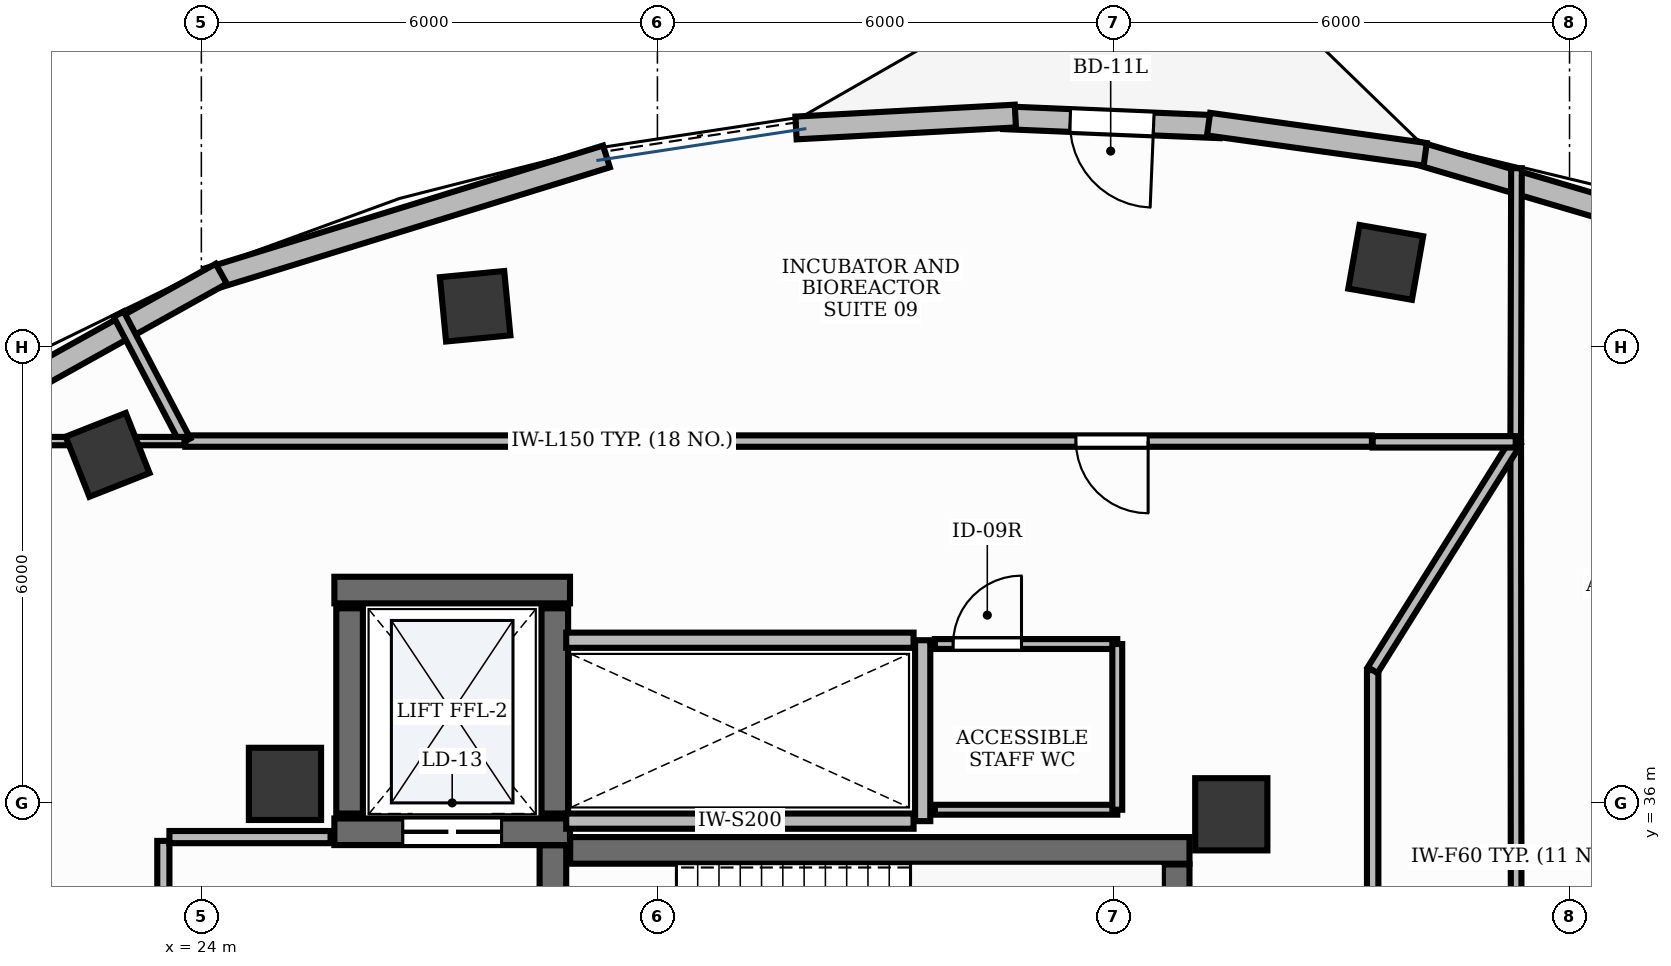
"""IFC4 building model, lengths in metres.
Left out: names, types, materials, properties, quantities, classifications, styles, units other than length and angle.
Written with IfcOpenShell. Run it as: python <this file> out.ifc"""

import sys

from ifc_helpers import new_model, si_unit, direction, frame, frame_2d, origin, origin_2d, place, context, subcontext, project, spatial, rectangle, extrude, element, fill, save


model = new_model("IFC4")
c1 = context("Model", 3, precision=1e-05, world=origin(), true_north=direction((0.0, 1.0)))
c2 = subcontext(c1, "Body", "Model", "MODEL_VIEW")
j1 = project(units=[si_unit("LENGTHUNIT", "METRE"), si_unit("PLANEANGLEUNIT", "RADIAN")], contexts=[c1])
p1 = place(None, origin())
s1 = spatial("IfcSite", under=j1, at=p1, CompositionType="ELEMENT")
p2 = place(p1, origin())
s2 = spatial("IfcBuilding", under=s1, at=p2, CompositionType="ELEMENT")
p3 = place(p2, frame((0.0, 0.0, 306.0)))
s3 = spatial("IfcBuildingStorey", under=s2, at=p3, CompositionType="ELEMENT", Elevation=306.0)
p4 = place(p3, frame((28.852, 35.375, 0.0), z_axis=(0.0, 0.0, 1.0), x_axis=(1.0, 0.0, 0.0)))
e1 = element("IfcWall", 1, at=p4, inside=s3, PredefinedType="SHEAR", context=c2, shape_type="SweptSolid", body=[
    extrude(rectangle(XDim=8.148, YDim=0.35, at=frame_2d((4.074, 0.0))), origin(), (0.0, 0.0, 1.0), 3.9),
])
p5 = place(p3, frame((36.825, 32.11, 0.0), z_axis=(0.0, 0.0, 1.0), x_axis=(0.0, 1.0, 0.0)))
e2 = element("IfcWall", 2, at=p5, inside=s3, PredefinedType="SHEAR", context=c2, shape_type="SweptSolid", body=[
    extrude(rectangle(XDim=3.08, YDim=0.35, at=frame_2d((1.54, 0.0))), origin(), (0.0, 0.0, 1.0), 3.9),
])
p6 = place(p3, frame((28.625, 32.11, 0.0), z_axis=(0.0, 0.0, 1.0), x_axis=(0.0, 1.0, 0.0)))
e3 = element("IfcWall", 3, at=p6, inside=s3, PredefinedType="SHEAR", context=c2, shape_type="SweptSolid", body=[
    extrude(rectangle(XDim=3.333, YDim=0.35, at=frame_2d((1.667, 0.0))), origin(), (0.0, 0.0, 1.0), 3.9),
])
p7 = place(p6, frame((0.2, 0.0, 0.0)))
e4 = element("IfcOpeningElement", 4, at=p7, cuts=e3, PredefinedType="OPENING", context=c2, shape_type="SweptSolid", body=[
    extrude(rectangle(XDim=1.05, YDim=2.15, at=frame_2d((0.525, 1.075))), frame((0.0, 0.19, 0.0), z_axis=(0.0, -1.0, 0.0), x_axis=(1.0, 0.0, 0.0)), (0.0, 0.0, 1.0), 0.38),
])
p8 = place(p3, frame((25.75, 38.8, 0.0), z_axis=(0.0, 0.0, 1.0), x_axis=(1.0, 0.0, 0.0)))
e5 = element("IfcWall", 5, at=p8, inside=s3, PredefinedType="SHEAR", context=c2, shape_type="SweptSolid", body=[
    extrude(rectangle(XDim=3.1, YDim=0.35, at=frame_2d((1.55, 0.0))), origin(), (0.0, 0.0, 1.0), 3.9),
])
p9 = place(p3, frame((25.75, 35.62, 0.0), z_axis=(0.0, 0.0, 1.0), x_axis=(1.0, 0.0, 0.0)))
e6 = element("IfcWall", 6, at=p9, inside=s3, PredefinedType="SHEAR", context=c2, shape_type="SweptSolid", body=[
    extrude(rectangle(XDim=3.1, YDim=0.35, at=frame_2d((1.55, 0.0))), origin(), (0.0, 0.0, 1.0), 3.9),
])
p10 = place(p9, frame((0.9, 0.0, 0.0)))
e7 = element("IfcOpeningElement", 7, at=p10, cuts=e6, PredefinedType="OPENING", context=c2, shape_type="SweptSolid", body=[
    extrude(rectangle(XDim=1.3, YDim=2.2, at=frame_2d((0.65, 1.1))), frame((0.0, 0.19, 0.0), z_axis=(0.0, -1.0, 0.0), x_axis=(1.0, 0.0, 0.0)), (0.0, 0.0, 1.0), 0.38),
])
for number, where, z_axis, x_axis in (
    (8, (25.95, 35.86, 0.0), (0.0, 0.0, 1.0), (0.0, 1.0, 0.0)),
    (9, (28.65, 35.86, 0.0), (0.0, 0.0, 1.0), (0.0, 1.0, 0.0)),
):
    element("IfcWall", number, at=place(p3, frame(where, z_axis=z_axis, x_axis=x_axis)), inside=s3, PredefinedType="SHEAR", context=c2, shape_type="SweptSolid", body=[
        extrude(rectangle(XDim=2.7, YDim=0.35, at=frame_2d((1.35, 0.0))), origin(), (0.0, 0.0, 1.0), 3.9),
    ])
for number, where, z_axis, x_axis in (
    (10, (37.55, 35.85, -0.0), (0.0, 0.0, 1.0), (1.0, 0.0, 0.0)),
    (11, (25.1, 36.25, -0.0), (0.0, 0.0, 1.0), (1.0, 0.0, 0.0)),
):
    element("IfcColumn", number, at=place(p3, frame(where, z_axis=z_axis, x_axis=x_axis)), inside=s3, PredefinedType="PILASTER", context=c2, shape_type="SweptSolid", body=[
        extrude(rectangle(XDim=0.95, YDim=0.95, at=origin_2d()), origin(), (0.0, 0.0, 1.0), 3.901),
    ])
for number, where, z_axis, x_axis in (
    (12, (39.582, 43.111, -0.0), (0.0, 0.0, 1.0), (-0.985, 0.173, 0.0)),
    (13, (27.602, 42.534, -0.0), (0.0, 0.0, 1.0), (0.995, 0.095, 0.0)),
    (14, (22.766, 40.579, -0.0), (0.0, 0.0, 1.0), (0.93, 0.367, 0.0)),
):
    element("IfcColumn", number, at=place(p3, frame(where, z_axis=z_axis, x_axis=x_axis)), inside=s3, PredefinedType="COLUMN", context=c2, shape_type="SweptSolid", body=[
        extrude(rectangle(XDim=0.85, YDim=0.85, at=origin_2d()), origin(), (0.0, 0.0, 1.0), 3.901),
    ])
p11 = place(p3, frame((37.403, 44.895, 0.0), z_axis=(0.0, 0.0, 1.0), x_axis=(-0.999122802085, 0.041876322124, 0.0)))
e15 = element("IfcWall", 15, at=p11, inside=s3, PredefinedType="STANDARD", context=c2, shape_type="SweptSolid", body=[
    extrude(rectangle(XDim=2.851, YDim=0.3, at=frame_2d((1.425, 0.0))), origin(), (0.0, 0.0, 1.0), 3.9),
])
p12 = place(p11, frame((0.875, 0.0, 0.0)))
e16 = element("IfcOpeningElement", 16, at=p12, cuts=e15, PredefinedType="OPENING", context=c2, shape_type="SweptSolid", body=[
    extrude(rectangle(XDim=1.1, YDim=2.15, at=frame_2d((0.55, 1.075))), frame((0.0, 0.165, 0.0), z_axis=(0.0, -1.0, 0.0), x_axis=(1.0, 0.0, 0.0)), (0.0, 0.0, 1.0), 0.33),
])
p13 = place(p3, frame((45.197, 43.018, 0.0), z_axis=(0.0, 0.0, 1.0), x_axis=(-0.959276315934, 0.282469378321, 0.0)))
e17 = element("IfcWall", 17, at=p13, inside=s3, PredefinedType="STANDARD", context=c2, shape_type="SweptSolid", body=[
    extrude(rectangle(XDim=5.495, YDim=0.3, at=frame_2d((2.748, 0.0))), origin(), (0.0, 0.0, 1.0), 3.9),
])
p14 = place(p3, frame((40.101, 44.532, 0.0), z_axis=(0.0, 0.0, 1.0), x_axis=(-0.990425679684, 0.138046995703, 0.0)))
e18 = element("IfcWall", 18, at=p14, inside=s3, PredefinedType="STANDARD", context=c2, shape_type="SweptSolid", body=[
    extrude(rectangle(XDim=2.877, YDim=0.3, at=frame_2d((1.439, 0.0))), origin(), (0.0, 0.0, 1.0), 3.9),
])
p15 = place(p3, frame((34.709, 45.036, 0.0), z_axis=(0.0, 0.0, 1.0), x_axis=(-0.998532534801, -0.054155119283, 0.0)))
e19 = element("IfcWall", 19, at=p15, inside=s3, PredefinedType="STANDARD", context=c2, shape_type="SweptSolid", body=[
    extrude(rectangle(XDim=2.89, YDim=0.3, at=frame_2d((1.445, 0.0))), origin(), (0.0, 0.0, 1.0), 3.9),
])
p16 = place(p3, frame((29.33, 44.505, 0.0), z_axis=(0.0, 0.0, 1.0), x_axis=(-0.955535200816, -0.29487705913, 0.0)))
e20 = element("IfcWall", 20, at=p16, inside=s3, PredefinedType="STANDARD", context=c2, shape_type="SweptSolid", body=[
    extrude(rectangle(XDim=5.485, YDim=0.3, at=frame_2d((2.743, 0.0))), origin(), (0.0, 0.0, 1.0), 3.47),
])
p17 = place(p3, frame((24.262, 42.962, 0.0), z_axis=(0.0, 0.0, 1.0), x_axis=(-0.87350676692, -0.486812004932, 0.0)))
e21 = element("IfcWall", 21, at=p17, inside=s3, PredefinedType="STANDARD", context=c2, shape_type="SweptSolid", body=[
    extrude(rectangle(XDim=5.282, YDim=0.3, at=frame_2d((2.641, 0.0))), origin(), (0.0, 0.0, 1.0), 3.47),
])
p18 = place(p3, frame((33.49, 35.76, 0.0), z_axis=(0.0, 0.0, 1.0), x_axis=(0.0, 1.0, 0.0)))
e22 = element("IfcWall", 22, at=p18, inside=s3, PredefinedType="PARTITIONING", context=c2, shape_type="SweptSolid", body=[
    extrude(rectangle(XDim=2.38, YDim=0.2, at=frame_2d((1.19, 0.0))), origin(), (0.0, 0.0, 1.0), 2.91),
])
for number, where, z_axis, x_axis in (
    (23, (28.8, 35.76, 0.0), (0.0, 0.0, 1.0), (1.0, 0.0, 0.0)),
    (24, (28.8, 38.14, 0.0), (0.0, 0.0, 1.0), (1.0, 0.0, 0.0)),
):
    element("IfcWall", number, at=place(p3, frame(where, z_axis=z_axis, x_axis=x_axis)), inside=s3, PredefinedType="PARTITIONING", context=c2, shape_type="SweptSolid", body=[
        extrude(rectangle(XDim=4.57, YDim=0.2, at=frame_2d((2.285, 0.0))), origin(), (0.0, 0.0, 1.0), 2.91),
    ])
p19 = place(p3, frame((23.5, 32.1, 0.0), z_axis=(0.0, 0.0, 1.0), x_axis=(0.0, 1.0, 0.0)))
e25 = element("IfcWall", 25, at=p19, inside=s3, PredefinedType="PARTITIONING", context=c2, shape_type="SweptSolid", body=[
    extrude(rectangle(XDim=3.4, YDim=0.16, at=frame_2d((1.7, 0.0))), origin(), (0.0, 0.0, 1.0), 2.91),
])
p20 = place(p19, frame((1.175, 0.0, 0.0)))
e26 = element("IfcOpeningElement", 26, at=p20, cuts=e25, PredefinedType="OPENING", context=c2, shape_type="SweptSolid", body=[
    extrude(rectangle(XDim=1.05, YDim=2.15, at=frame_2d((0.525, 1.075))), frame((0.0, 0.095, 0.0), z_axis=(0.0, -1.0, 0.0), x_axis=(1.0, 0.0, 0.0)), (0.0, 0.0, 1.0), 0.19),
])
p21 = place(p3, frame((23.58, 35.55, 0.0), z_axis=(0.0, 0.0, 1.0), x_axis=(1.0, 0.0, 0.0)))
e27 = element("IfcWall", 27, at=p21, inside=s3, PredefinedType="PARTITIONING", context=c2, shape_type="SweptSolid", body=[
    extrude(rectangle(XDim=2.12, YDim=0.16, at=frame_2d((1.06, 0.0))), origin(), (0.0, 0.0, 1.0), 2.91),
])
p22 = place(p3, frame((33.65, 38.09, 0.0), z_axis=(0.0, 0.0, 1.0), x_axis=(1.0, 0.0, 0.0)))
e28 = element("IfcWall", 28, at=p22, inside=s3, PredefinedType="PARTITIONING", context=c2, shape_type="SweptSolid", body=[
    extrude(rectangle(XDim=2.4, YDim=0.13, at=frame_2d((1.2, 0.0))), origin(), (0.0, 0.0, 1.0), 2.91),
])
p23 = place(p22, frame((0.24, 0.0, 0.0)))
e29 = element("IfcOpeningElement", 29, at=p23, cuts=e28, PredefinedType="OPENING", context=c2, shape_type="SweptSolid", body=[
    extrude(rectangle(XDim=0.9, YDim=2.15, at=frame_2d((0.45, 1.075))), frame((0.0, 0.08, 0.0), z_axis=(0.0, -1.0, 0.0), x_axis=(1.0, 0.0, 0.0)), (0.0, 0.0, 1.0), 0.16),
])
p24 = place(p3, frame((39.41, 29.322, 0.0), z_axis=(0.0, 0.0, 1.0), x_axis=(0.0, 1.0, 0.0)))
e30 = element("IfcWall", 30, at=p24, inside=s3, PredefinedType="PARTITIONING", context=c2, shape_type="SweptSolid", body=[
    extrude(rectangle(XDim=8.425, YDim=0.15, at=frame_2d((4.213, 0.0))), origin(), (0.0, 0.0, 1.0), 2.91),
])
p25 = place(p24, frame((0.881, 0.0, 0.0)))
e31 = element("IfcOpeningElement", 31, at=p25, cuts=e30, PredefinedType="OPENING", context=c2, shape_type="SweptSolid", body=[
    extrude(rectangle(XDim=0.95, YDim=2.15, at=frame_2d((0.475, 1.075))), frame((0.0, 0.09, 0.0), z_axis=(0.0, -1.0, 0.0), x_axis=(1.0, 0.0, 0.0)), (0.0, 0.0, 1.0), 0.18),
])
p26 = place(p3, frame((39.4, 40.76, 0.0), z_axis=(0.0, 0.0, 1.0), x_axis=(-1.0, 0.0, 0.0)))
e32 = element("IfcWall", 32, at=p26, inside=s3, PredefinedType="PARTITIONING", context=c2, shape_type="SweptSolid", body=[
    extrude(rectangle(XDim=15.611, YDim=0.15, at=frame_2d((7.805, 0.0))), origin(), (0.0, 0.0, 1.0), 2.91),
])
p27 = place(p26, frame((2.944, 0.0, 0.0)))
e33 = element("IfcOpeningElement", 33, at=p27, cuts=e32, PredefinedType="OPENING", context=c2, shape_type="SweptSolid", body=[
    extrude(rectangle(XDim=0.95, YDim=2.15, at=frame_2d((0.475, 1.075))), frame((0.0, 0.09, 0.0), z_axis=(0.0, -1.0, 0.0), x_axis=(1.0, 0.0, 0.0)), (0.0, 0.0, 1.0), 0.18),
])
p28 = place(p3, frame((36.05, 35.91, 0.0), z_axis=(0.0, 0.0, 1.0), x_axis=(-1.0, 0.0, 0.0)))
e34 = element("IfcWall", 34, at=p28, inside=s3, PredefinedType="PARTITIONING", context=c2, shape_type="SweptSolid", body=[
    extrude(rectangle(XDim=2.4, YDim=0.13, at=frame_2d((1.2, 0.0))), origin(), (0.0, 0.0, 1.0), 2.91),
])
p29 = place(p3, frame((36.05, 38.09, 0.0), z_axis=(0.0, 0.0, 1.0), x_axis=(0.0, -1.0, 0.0)))
e35 = element("IfcWall", 35, at=p29, inside=s3, PredefinedType="PARTITIONING", context=c2, shape_type="SweptSolid", body=[
    extrude(rectangle(XDim=2.18, YDim=0.13, at=frame_2d((1.09, 0.0))), origin(), (0.0, 0.0, 1.0), 2.91),
])
p30 = place(p3, frame((41.302, 29.837, 0.0), z_axis=(0.0, 0.0, 1.0), x_axis=(-0.000917225565, 0.999999579349, 0.0)))
e36 = element("IfcWall", 36, at=p30, inside=s3, PredefinedType="PARTITIONING", context=c2, shape_type="SweptSolid", body=[
    extrude(rectangle(XDim=10.913, YDim=0.14, at=frame_2d((5.457, 0.0))), origin(), (0.0, 0.0, 1.0), 2.91),
])
p31 = place(p3, frame((41.292, 40.75, 0.0), z_axis=(0.0, 0.0, 1.0), x_axis=(0.002780404281, 0.999996134669, 0.0)))
e37 = element("IfcWall", 37, at=p31, inside=s3, PredefinedType="PARTITIONING", context=c2, shape_type="SweptSolid", body=[
    extrude(rectangle(XDim=3.6, YDim=0.14, at=frame_2d((1.8, 0.0))), origin(), (0.0, 0.0, 1.0), 2.91),
])
p32 = place(p3, frame((39.41, 37.747, 0.0), z_axis=(0.0, 0.0, 1.0), x_axis=(0.53106358892, 0.847331968312, 0.0)))
e38 = element("IfcWall", 38, at=p32, inside=s3, PredefinedType="PARTITIONING", context=c2, shape_type="SweptSolid", body=[
    extrude(rectangle(XDim=3.544, YDim=0.15, at=frame_2d((1.772, 0.0))), origin(), (0.0, 0.0, 1.0), 2.91),
])
p33 = place(p3, frame((41.292, 40.75, 0.0), z_axis=(0.0, 0.0, 1.0), x_axis=(-1.0, 0.0, 0.0)))
e39 = element("IfcWall", 39, at=p33, inside=s3, PredefinedType="PARTITIONING", context=c2, shape_type="SweptSolid", body=[
    extrude(rectangle(XDim=1.882, YDim=0.15, at=frame_2d((0.941, 0.0))), origin(), (0.0, 0.0, 1.0), 2.91),
])
p34 = place(p3, frame((23.789, 40.76, 0.0), z_axis=(0.0, 0.0, 1.0), x_axis=(-0.464828826697, 0.885400565773, 0.0)))
e40 = element("IfcWall", 40, at=p34, inside=s3, PredefinedType="PARTITIONING", context=c2, shape_type="SweptSolid", body=[
    extrude(rectangle(XDim=1.887, YDim=0.15, at=frame_2d((0.943, 0.0))), origin(), (0.0, 0.0, 1.0), 2.91),
])
p35 = place(p3, frame((23.778, 40.76, 0.0), z_axis=(0.0, 0.0, 1.0), x_axis=(-1.0, 0.0, 0.0)))
e41 = element("IfcWall", 41, at=p35, inside=s3, PredefinedType="MOVABLE", context=c2, shape_type="SweptSolid", body=[
    extrude(rectangle(XDim=1.978, YDim=0.11, at=frame_2d((0.989, 0.0))), origin(), (0.0, 0.0, 1.0), 2.91),
])
p36 = place(p12, origin())
e42 = element("IfcDoor", 42, at=p36, inside=s3, OperationType="SINGLE_SWING_LEFT", PredefinedType="DOOR", context=c2, shape_type="SweptSolid", body=[
    extrude(rectangle(XDim=1.1, YDim=2.15, at=frame_2d((0.55, 1.075))), frame((0.0, 0.025, 0.0), z_axis=(0.0, -1.0, 0.0), x_axis=(1.0, 0.0, 0.0)), (0.0, 0.0, 1.0), 0.05),
])
fill(e16, e42)
p37 = place(p10, origin())
e43 = element("IfcDoor", 43, at=p37, inside=s3, OperationType="DOUBLE_DOOR_SLIDING", PredefinedType="DOOR", context=c2, shape_type="SweptSolid", body=[
    extrude(rectangle(XDim=1.3, YDim=2.2, at=frame_2d((0.65, 1.1))), frame((0.0, 0.025, 0.0), z_axis=(0.0, -1.0, 0.0), x_axis=(1.0, 0.0, 0.0)), (0.0, 0.0, 1.0), 0.05),
])
fill(e7, e43)
p38 = place(p23, origin())
e44 = element("IfcDoor", 44, at=p38, inside=s3, OperationType="SINGLE_SWING_RIGHT", PredefinedType="DOOR", context=c2, shape_type="SweptSolid", body=[
    extrude(rectangle(XDim=0.9, YDim=2.15, at=frame_2d((0.45, 1.075))), frame((0.0, 0.025, 0.0), z_axis=(0.0, -1.0, 0.0), x_axis=(1.0, 0.0, 0.0)), (0.0, 0.0, 1.0), 0.05),
])
fill(e29, e44)
p39 = place(p27, origin())
e45 = element("IfcDoor", 45, at=p39, inside=s3, OperationType="SINGLE_SWING_LEFT", PredefinedType="DOOR", context=c2, shape_type="SweptSolid", body=[
    extrude(rectangle(XDim=0.95, YDim=2.15, at=frame_2d((0.475, 1.075))), frame((0.0, 0.025, 0.0), z_axis=(0.0, -1.0, 0.0), x_axis=(1.0, 0.0, 0.0)), (0.0, 0.0, 1.0), 0.05),
])
fill(e33, e45)
save(model, sys.argv[1])
